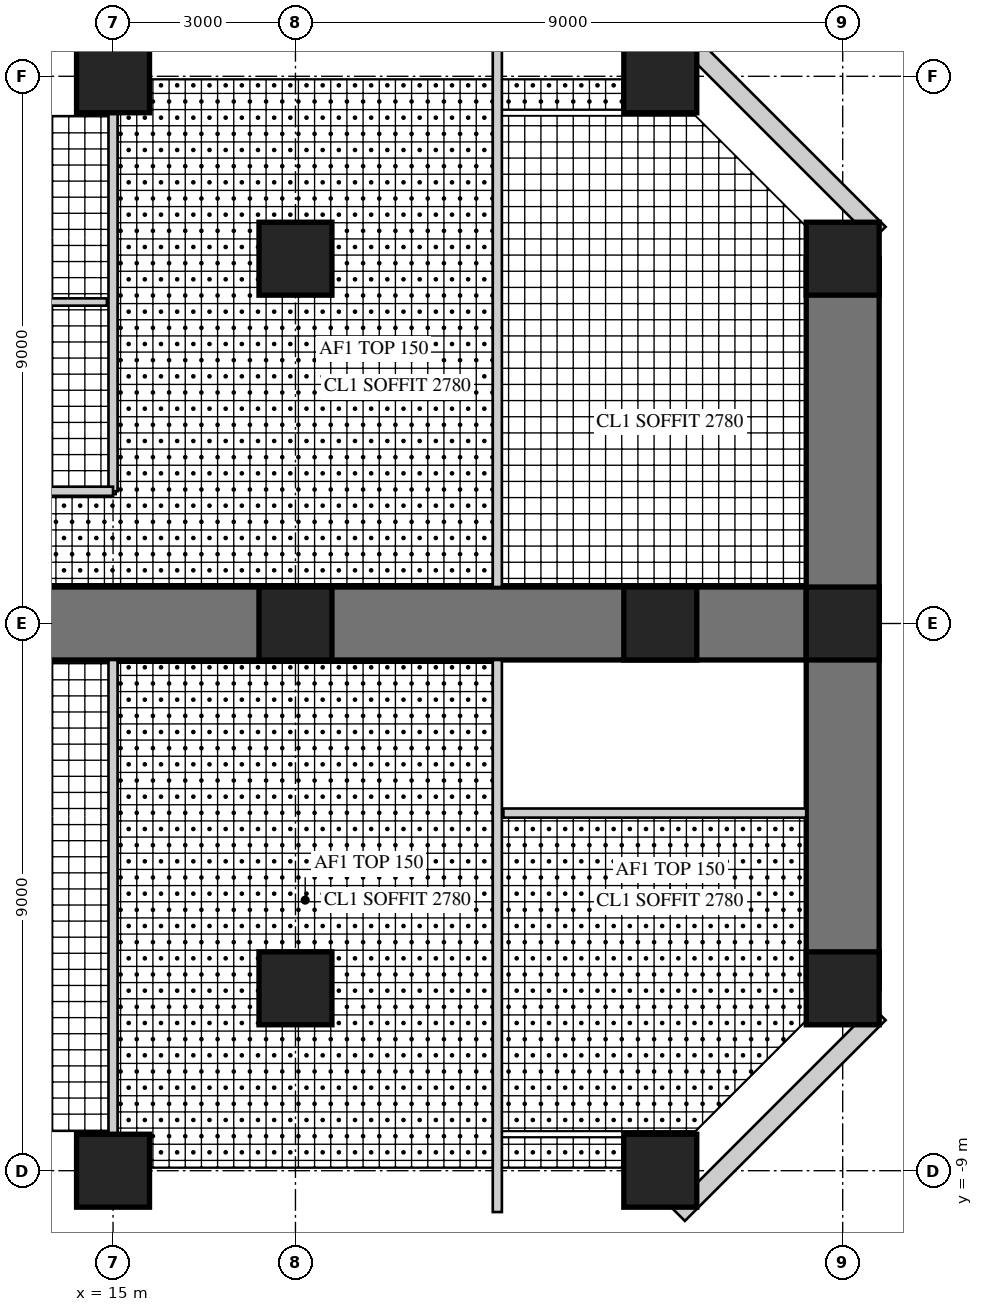
"""IFC4 building model, lengths in metres.
Left out: names, types, materials, properties, quantities, classifications, styles, units other than length and angle.
Written with IfcOpenShell. Run it as: python <this file> out.ifc"""

import sys

from ifc_helpers import new_model, si_unit, direction, frame, frame_2d, origin, origin_2d, place, context, subcontext, project, spatial, rectangle, hollow_rectangle, extrude, element, fill, save


model = new_model("IFC4")
c1 = context("Model", 3, precision=1e-05, world=origin(), true_north=direction((0.0, 1.0)))
c2 = subcontext(c1, "Body", "Model", "MODEL_VIEW")
j1 = project(units=[si_unit("LENGTHUNIT", "METRE"), si_unit("PLANEANGLEUNIT", "RADIAN")], contexts=[c1])
p1 = place(None, origin())
s1 = spatial("IfcSite", under=j1, at=p1, CompositionType="ELEMENT")
p2 = place(p1, origin())
s2 = spatial("IfcBuilding", under=s1, at=p2, CompositionType="ELEMENT")
p3 = place(p2, frame((0.0, 0.0, 47.5)))
s3 = spatial("IfcBuildingStorey", under=s2, at=p3, CompositionType="ELEMENT", Elevation=47.5)
p4 = place(p3, frame((9.0, 0.0, 0.0), z_axis=(0.0, 0.0, 1.0), x_axis=(1.0, 0.0, 0.0)))
e1 = element("IfcWall", 1, at=p4, inside=s3, PredefinedType="SHEAR", context=c2, shape_type="SweptSolid", body=[
    extrude(rectangle(XDim=18.0, YDim=1.2, at=frame_2d((9.0, 0.0))), origin(), (0.0, 0.0, 1.0), 4.0),
])
p5 = place(p4, frame((9.9, 0.0, 0.0)))
e2 = element("IfcOpeningElement", 2, at=p5, cuts=e1, PredefinedType="OPENING", context=c2, shape_type="SweptSolid", body=[
    extrude(rectangle(XDim=1.0, YDim=2.2, at=frame_2d((0.5, 1.1))), frame((0.0, 0.61, 0.0), z_axis=(0.0, -1.0, 0.0), x_axis=(1.0, 0.0, 0.0)), (0.0, 0.0, 1.0), 1.22),
])
p6 = place(p3, frame((27.0, -6.0, 0.0), z_axis=(0.0, 0.0, 1.0), x_axis=(0.0, 1.0, 0.0)))
e3 = element("IfcWall", 3, at=p6, inside=s3, PredefinedType="SHEAR", context=c2, shape_type="SweptSolid", body=[
    extrude(rectangle(XDim=12.0, YDim=1.2, at=frame_2d((6.0, 0.0))), origin(), (0.0, 0.0, 1.0), 4.0),
])
p7 = place(p6, frame((1.6, 0.0, 0.6)))
e4 = element("IfcOpeningElement", 4, at=p7, cuts=e3, PredefinedType="OPENING", context=c2, shape_type="SweptSolid", body=[
    extrude(rectangle(XDim=3.0, YDim=2.4, at=frame_2d((1.5, 1.2))), frame((0.0, 0.61, 0.0), z_axis=(0.0, -1.0, 0.0), x_axis=(1.0, 0.0, 0.0)), (0.0, 0.0, 1.0), 1.22),
])
p8 = place(p6, frame((7.4, 0.0, 0.6)))
e5 = element("IfcOpeningElement", 5, at=p8, cuts=e3, PredefinedType="OPENING", context=c2, shape_type="SweptSolid", body=[
    extrude(rectangle(XDim=3.0, YDim=2.4, at=frame_2d((1.5, 1.2))), frame((0.0, 0.61, 0.0), z_axis=(0.0, -1.0, 0.0), x_axis=(1.0, 0.0, 0.0)), (0.0, 0.0, 1.0), 1.22),
])
for number, where, z_axis, x_axis in (
    (6, (15.0, -9.0, 0.0), (0.0, 0.0, 1.0), (1.0, 0.0, 0.0)),
    (7, (24.0, -9.0, 0.0), (0.0, 0.0, 1.0), (1.0, 0.0, 0.0)),
    (8, (15.0, 9.0, 0.0), (0.0, 0.0, 1.0), (1.0, 0.0, 0.0)),
    (9, (24.0, 9.0, 0.0), (0.0, 0.0, 1.0), (1.0, 0.0, 0.0)),
    (10, (27.0, -6.0, 0.0), (0.0, 0.0, 1.0), (1.0, 0.0, 0.0)),
    (11, (27.0, 0.0, 0.0), (0.0, 0.0, 1.0), (1.0, 0.0, 0.0)),
    (12, (27.0, 6.0, 0.0), (0.0, 0.0, 1.0), (1.0, 0.0, 0.0)),
    (13, (18.0, -6.0, 0.0), (0.0, 0.0, 1.0), (1.0, 0.0, 0.0)),
    (14, (18.0, 0.0, 0.0), (0.0, 0.0, 1.0), (1.0, 0.0, 0.0)),
    (15, (18.0, 6.0, 0.0), (0.0, 0.0, 1.0), (1.0, 0.0, 0.0)),
    (16, (24.0, 0.0, 0.0), (0.0, 0.0, 1.0), (1.0, 0.0, 0.0)),
):
    element("IfcColumn", number, at=place(p3, frame(where, z_axis=z_axis, x_axis=x_axis)), inside=s3, PredefinedType="COLUMN", context=c2, shape_type="SweptSolid", body=[
        extrude(rectangle(XDim=1.2, YDim=1.2, at=origin_2d()), origin(), (0.0, 0.0, 1.0), 4.0),
    ])
p9 = place(p3, frame((24.298, -9.72, 0.0), z_axis=(0.0, 0.0, 1.0), x_axis=(0.707106781187, 0.707106781187, 0.0)))
e17 = element("IfcWall", 17, at=p9, inside=s3, PredefinedType="SOLIDWALL", context=c2, shape_type="SweptSolid", body=[
    extrude(rectangle(XDim=4.669, YDim=0.3, at=frame_2d((2.335, 0.0))), origin(), (0.0, 0.0, 1.0), 3.8),
])
p10 = place(p9, frame((1.885, 0.0, 0.3)))
e18 = element("IfcOpeningElement", 18, at=p10, cuts=e17, PredefinedType="OPENING", context=c2, shape_type="SweptSolid", body=[
    extrude(rectangle(XDim=0.9, YDim=2.4, at=frame_2d((0.45, 1.2))), frame((0.0, 0.16, 0.0), z_axis=(0.0, -1.0, 0.0), x_axis=(1.0, 0.0, 0.0)), (0.0, 0.0, 1.0), 0.32),
])
p11 = place(p3, frame((27.6, 6.418, 0.0), z_axis=(0.0, 0.0, 1.0), x_axis=(-0.707106781187, 0.707106781187, 0.0)))
e19 = element("IfcWall", 19, at=p11, inside=s3, PredefinedType="SOLIDWALL", context=c2, shape_type="SweptSolid", body=[
    extrude(rectangle(XDim=4.669, YDim=0.3, at=frame_2d((2.335, 0.0))), origin(), (0.0, 0.0, 1.0), 3.8),
])
p12 = place(p11, frame((1.885, 0.0, 0.3)))
e20 = element("IfcOpeningElement", 20, at=p12, cuts=e19, PredefinedType="OPENING", context=c2, shape_type="SweptSolid", body=[
    extrude(rectangle(XDim=0.9, YDim=2.4, at=frame_2d((0.45, 1.2))), frame((0.0, 0.16, 0.0), z_axis=(0.0, -1.0, 0.0), x_axis=(1.0, 0.0, 0.0)), (0.0, 0.0, 1.0), 0.32),
])
p13 = place(p3, frame((15.0, 2.175, 0.0), z_axis=(0.0, 0.0, 1.0), x_axis=(0.0, 1.0, 0.0)))
e21 = element("IfcWall", 21, at=p13, inside=s3, PredefinedType="PARTITIONING", context=c2, shape_type="SweptSolid", body=[
    extrude(rectangle(XDim=6.225, YDim=0.15, at=frame_2d((3.112, 0.0))), origin(), (0.0, 0.0, 1.0), 2.95),
])
p14 = place(p13, frame((1.056, 0.0, 0.0)))
e22 = element("IfcOpeningElement", 22, at=p14, cuts=e21, PredefinedType="OPENING", context=c2, shape_type="SweptSolid", body=[
    extrude(rectangle(XDim=1.0, YDim=2.1, at=frame_2d((0.5, 1.05))), frame((0.0, 0.085, 0.0), z_axis=(0.0, -1.0, 0.0), x_axis=(1.0, 0.0, 0.0)), (0.0, 0.0, 1.0), 0.17),
])
p15 = place(p13, frame((4.169, 0.0, 0.0)))
e23 = element("IfcOpeningElement", 23, at=p15, cuts=e21, PredefinedType="OPENING", context=c2, shape_type="SweptSolid", body=[
    extrude(rectangle(XDim=1.0, YDim=2.1, at=frame_2d((0.5, 1.05))), frame((0.0, 0.085, 0.0), z_axis=(0.0, -1.0, 0.0), x_axis=(1.0, 0.0, 0.0)), (0.0, 0.0, 1.0), 0.17),
])
p16 = place(p3, frame((9.65, 2.175, 0.0), z_axis=(0.0, 0.0, 1.0), x_axis=(1.0, 0.0, 0.0)))
e24 = element("IfcWall", 24, at=p16, inside=s3, PredefinedType="PARTITIONING", context=c2, shape_type="SweptSolid", body=[
    extrude(rectangle(XDim=5.35, YDim=0.15, at=frame_2d((2.675, 0.0))), origin(), (0.0, 0.0, 1.0), 3.8),
])
p17 = place(p3, frame((9.65, 5.288, 0.0), z_axis=(0.0, 0.0, 1.0), x_axis=(1.0, 0.0, 0.0)))
e25 = element("IfcWall", 25, at=p17, inside=s3, PredefinedType="PLUMBINGWALL", context=c2, shape_type="SweptSolid", body=[
    extrude(rectangle(XDim=5.25, YDim=0.12, at=frame_2d((2.625, 0.0))), origin(), (0.0, 0.0, 1.0), 3.8),
])
p18 = place(p3, frame((15.0, -8.4, 0.0), z_axis=(0.0, 0.0, 1.0), x_axis=(0.0, 1.0, 0.0)))
e26 = element("IfcWall", 26, at=p18, inside=s3, PredefinedType="PARTITIONING", context=c2, shape_type="SweptSolid", body=[
    extrude(rectangle(XDim=7.8, YDim=0.15, at=frame_2d((3.9, 0.0))), origin(), (0.0, 0.0, 1.0), 2.95),
])
p19 = place(p18, frame((3.4, 0.0, 0.0)))
e27 = element("IfcOpeningElement", 27, at=p19, cuts=e26, PredefinedType="OPENING", context=c2, shape_type="SweptSolid", body=[
    extrude(rectangle(XDim=1.0, YDim=2.1, at=frame_2d((0.5, 1.05))), frame((0.0, 0.085, 0.0), z_axis=(0.0, -1.0, 0.0), x_axis=(1.0, 0.0, 0.0)), (0.0, 0.0, 1.0), 0.17),
])
p20 = place(p3, frame((21.32, 0.6, 0.0), z_axis=(0.0, 0.0, 1.0), x_axis=(0.0, 1.0, 0.0)))
e28 = element("IfcWall", 28, at=p20, inside=s3, PredefinedType="PARTITIONING", context=c2, shape_type="SweptSolid", body=[
    extrude(rectangle(XDim=9.08, YDim=0.15, at=frame_2d((4.54, 0.0))), origin(), (0.0, 0.0, 1.0), 3.8),
])
p21 = place(p20, frame((0.45, 0.0, 0.0)))
e29 = element("IfcOpeningElement", 29, at=p21, cuts=e28, PredefinedType="OPENING", context=c2, shape_type="SweptSolid", body=[
    extrude(rectangle(XDim=1.0, YDim=2.2, at=frame_2d((0.5, 1.1))), frame((0.0, 0.085, 0.0), z_axis=(0.0, -1.0, 0.0), x_axis=(1.0, 0.0, 0.0)), (0.0, 0.0, 1.0), 0.17),
])
p22 = place(p3, frame((21.42, -3.118, 0.0), z_axis=(0.0, 0.0, 1.0), x_axis=(1.0, 0.0, 0.0)))
e30 = element("IfcWall", 30, at=p22, inside=s3, PredefinedType="PARTITIONING", context=c2, shape_type="SweptSolid", body=[
    extrude(rectangle(XDim=4.98, YDim=0.15, at=frame_2d((2.49, 0.0))), origin(), (0.0, 0.0, 1.0), 3.8),
])
p23 = place(p3, frame((21.32, -9.68, 0.0), z_axis=(0.0, 0.0, 1.0), x_axis=(0.0, 1.0, 0.0)))
e31 = element("IfcWall", 31, at=p23, inside=s3, PredefinedType="PARTITIONING", context=c2, shape_type="SweptSolid", body=[
    extrude(rectangle(XDim=9.08, YDim=0.15, at=frame_2d((4.54, 0.0))), origin(), (0.0, 0.0, 1.0), 3.8),
])
p24 = place(p23, frame((5.087, 0.0, 0.0)))
e32 = element("IfcOpeningElement", 32, at=p24, cuts=e31, PredefinedType="OPENING", context=c2, shape_type="SweptSolid", body=[
    extrude(rectangle(XDim=1.0, YDim=2.2, at=frame_2d((0.5, 1.1))), frame((0.0, 0.085, 0.0), z_axis=(0.0, -1.0, 0.0), x_axis=(1.0, 0.0, 0.0)), (0.0, 0.0, 1.0), 0.17),
])
p25 = place(p23, frame((7.73, 0.0, 0.0)))
e33 = element("IfcOpeningElement", 33, at=p25, cuts=e31, PredefinedType="OPENING", context=c2, shape_type="SweptSolid", body=[
    extrude(rectangle(XDim=1.0, YDim=2.2, at=frame_2d((0.5, 1.1))), frame((0.0, 0.085, 0.0), z_axis=(0.0, -1.0, 0.0), x_axis=(1.0, 0.0, 0.0)), (0.0, 0.0, 1.0), 0.17),
])
p26 = place(p10, origin())
e34 = element("IfcWindow", 34, at=p26, inside=s3, PartitioningType="SINGLE_PANEL", PredefinedType="WINDOW", context=c2, shape_type="SweptSolid", body=[
    extrude(hollow_rectangle(XDim=0.9, YDim=2.4, WallThickness=0.06, at=frame_2d((0.45, 1.2))), frame((0.0, 0.03, 0.0), z_axis=(0.0, -1.0, 0.0), x_axis=(1.0, 0.0, 0.0)), (0.0, 0.0, 1.0), 0.06),
    extrude(rectangle(XDim=0.779, YDim=2.279, at=frame_2d((0.45, 1.2))), frame((0.0, 0.03, 0.0), z_axis=(0.0, -1.0, 0.0), x_axis=(1.0, 0.0, 0.0)), (0.0, 0.0, 1.0), 0.06),
])
fill(e18, e34)
p27 = place(p7, origin())
e35 = element("IfcWindow", 35, at=p27, inside=s3, PartitioningType="SINGLE_PANEL", PredefinedType="WINDOW", context=c2, shape_type="SweptSolid", body=[
    extrude(hollow_rectangle(XDim=3.0, YDim=2.4, WallThickness=0.06, at=frame_2d((1.5, 1.2))), frame((0.0, 0.03, 0.0), z_axis=(0.0, -1.0, 0.0), x_axis=(1.0, 0.0, 0.0)), (0.0, 0.0, 1.0), 0.06),
    extrude(rectangle(XDim=2.879, YDim=2.279, at=frame_2d((1.5, 1.2))), frame((0.0, 0.03, 0.0), z_axis=(0.0, -1.0, 0.0), x_axis=(1.0, 0.0, 0.0)), (0.0, 0.0, 1.0), 0.06),
])
fill(e4, e35)
p28 = place(p8, origin())
e36 = element("IfcWindow", 36, at=p28, inside=s3, PartitioningType="SINGLE_PANEL", PredefinedType="WINDOW", context=c2, shape_type="SweptSolid", body=[
    extrude(hollow_rectangle(XDim=3.0, YDim=2.4, WallThickness=0.06, at=frame_2d((1.5, 1.2))), frame((0.0, 0.03, 0.0), z_axis=(0.0, -1.0, 0.0), x_axis=(1.0, 0.0, 0.0)), (0.0, 0.0, 1.0), 0.06),
    extrude(rectangle(XDim=2.879, YDim=2.279, at=frame_2d((1.5, 1.2))), frame((0.0, 0.03, 0.0), z_axis=(0.0, -1.0, 0.0), x_axis=(1.0, 0.0, 0.0)), (0.0, 0.0, 1.0), 0.06),
])
fill(e5, e36)
p29 = place(p12, origin())
e37 = element("IfcWindow", 37, at=p29, inside=s3, PartitioningType="SINGLE_PANEL", PredefinedType="WINDOW", context=c2, shape_type="SweptSolid", body=[
    extrude(hollow_rectangle(XDim=0.9, YDim=2.4, WallThickness=0.06, at=frame_2d((0.45, 1.2))), frame((0.0, 0.03, 0.0), z_axis=(0.0, -1.0, 0.0), x_axis=(1.0, 0.0, 0.0)), (0.0, 0.0, 1.0), 0.06),
    extrude(rectangle(XDim=0.779, YDim=2.279, at=frame_2d((0.45, 1.2))), frame((0.0, 0.03, 0.0), z_axis=(0.0, -1.0, 0.0), x_axis=(1.0, 0.0, 0.0)), (0.0, 0.0, 1.0), 0.06),
])
fill(e20, e37)
p30 = place(p14, origin())
e38 = element("IfcDoor", 38, at=p30, inside=s3, OperationType="SINGLE_SWING_LEFT", PredefinedType="DOOR", context=c2, shape_type="SweptSolid", body=[
    extrude(rectangle(XDim=1.0, YDim=2.1, at=frame_2d((0.5, 1.05))), frame((0.0, 0.025, 0.0), z_axis=(0.0, -1.0, 0.0), x_axis=(1.0, 0.0, 0.0)), (0.0, 0.0, 1.0), 0.05),
])
fill(e22, e38)
p31 = place(p15, origin())
e39 = element("IfcDoor", 39, at=p31, inside=s3, OperationType="SINGLE_SWING_LEFT", PredefinedType="DOOR", context=c2, shape_type="SweptSolid", body=[
    extrude(rectangle(XDim=1.0, YDim=2.1, at=frame_2d((0.5, 1.05))), frame((0.0, 0.025, 0.0), z_axis=(0.0, -1.0, 0.0), x_axis=(1.0, 0.0, 0.0)), (0.0, 0.0, 1.0), 0.05),
])
fill(e23, e39)
p32 = place(p19, origin())
e40 = element("IfcDoor", 40, at=p32, inside=s3, OperationType="SINGLE_SWING_RIGHT", PredefinedType="DOOR", context=c2, shape_type="SweptSolid", body=[
    extrude(rectangle(XDim=1.0, YDim=2.1, at=frame_2d((0.5, 1.05))), frame((0.0, 0.025, 0.0), z_axis=(0.0, -1.0, 0.0), x_axis=(1.0, 0.0, 0.0)), (0.0, 0.0, 1.0), 0.05),
])
fill(e27, e40)
p33 = place(p21, frame((1.0, 0.0, 0.0), z_axis=(0.0, 0.0, 1.0), x_axis=(-1.0, 0.0, 0.0)))
e41 = element("IfcDoor", 41, at=p33, inside=s3, OperationType="SINGLE_SWING_RIGHT", PredefinedType="DOOR", context=c2, shape_type="SweptSolid", body=[
    extrude(rectangle(XDim=1.0, YDim=2.2, at=frame_2d((0.5, 1.1))), frame((0.0, 0.025, 0.0), z_axis=(0.0, -1.0, 0.0), x_axis=(1.0, 0.0, 0.0)), (0.0, 0.0, 1.0), 0.05),
])
fill(e29, e41)
p34 = place(p24, frame((1.0, 0.0, 0.0), z_axis=(0.0, 0.0, 1.0), x_axis=(-1.0, 0.0, 0.0)))
e42 = element("IfcDoor", 42, at=p34, inside=s3, OperationType="SINGLE_SWING_LEFT", PredefinedType="DOOR", context=c2, shape_type="SweptSolid", body=[
    extrude(rectangle(XDim=1.0, YDim=2.2, at=frame_2d((0.5, 1.1))), frame((0.0, 0.025, 0.0), z_axis=(0.0, -1.0, 0.0), x_axis=(1.0, 0.0, 0.0)), (0.0, 0.0, 1.0), 0.05),
])
fill(e32, e42)
p35 = place(p25, frame((1.0, 0.0, 0.0), z_axis=(0.0, 0.0, 1.0), x_axis=(-1.0, 0.0, 0.0)))
e43 = element("IfcDoor", 43, at=p35, inside=s3, OperationType="SINGLE_SWING_LEFT", PredefinedType="DOOR", context=c2, shape_type="SweptSolid", body=[
    extrude(rectangle(XDim=1.0, YDim=2.2, at=frame_2d((0.5, 1.1))), frame((0.0, 0.025, 0.0), z_axis=(0.0, -1.0, 0.0), x_axis=(1.0, 0.0, 0.0)), (0.0, 0.0, 1.0), 0.05),
])
fill(e33, e43)
p36 = place(p5, frame((1.0, 0.0, 0.0), z_axis=(0.0, 0.0, 1.0), x_axis=(-1.0, 0.0, 0.0)))
e44 = element("IfcDoor", 44, at=p36, inside=s3, OperationType="SINGLE_SWING_LEFT", PredefinedType="DOOR", context=c2, shape_type="SweptSolid", body=[
    extrude(rectangle(XDim=1.0, YDim=2.2, at=frame_2d((0.5, 1.1))), frame((0.0, 0.025, 0.0), z_axis=(0.0, -1.0, 0.0), x_axis=(1.0, 0.0, 0.0)), (0.0, 0.0, 1.0), 0.05),
])
fill(e2, e44)
save(model, sys.argv[1])
